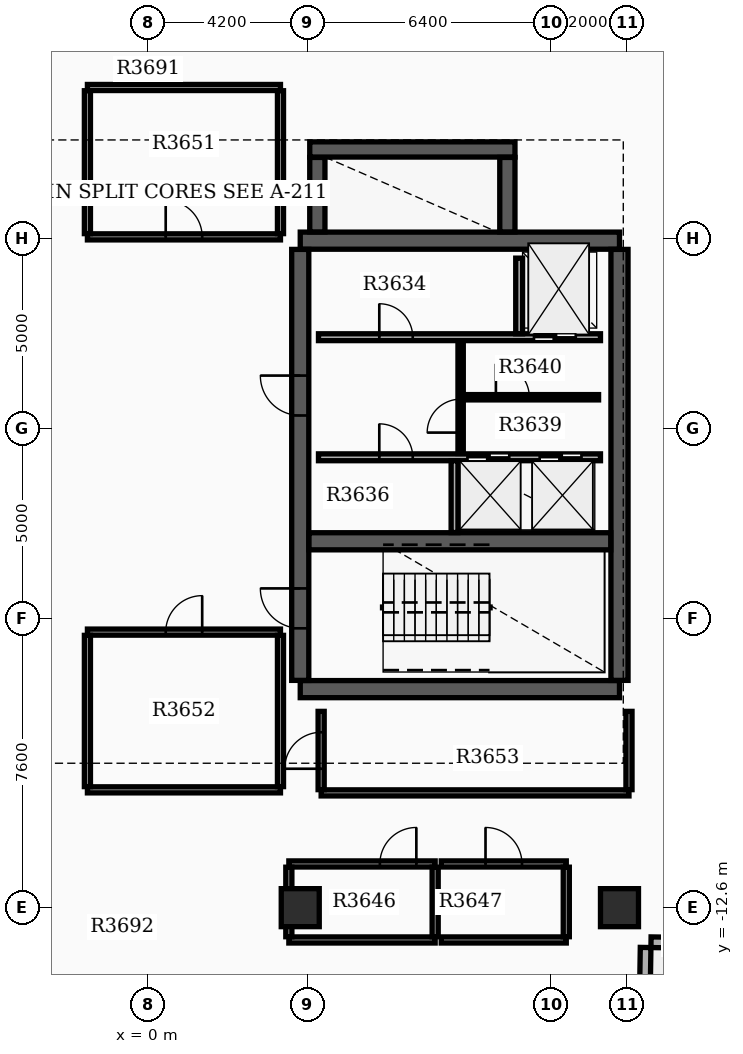
"""IFC4 building model, lengths in metres.
Left out: names, types, materials, properties, quantities, classifications, styles, units other than length and angle.
Written with IfcOpenShell. Run it as: python <this file> out.ifc"""

import sys

from ifc_helpers import new_model, si_unit, direction, frame, frame_2d, origin, origin_2d, place, context, subcontext, project, spatial, rectangle, extrude, element, fill, save


model = new_model("IFC4")
c1 = context("Model", 3, precision=1e-05, world=origin(), true_north=direction((0.0, 1.0)))
c2 = subcontext(c1, "Body", "Model", "MODEL_VIEW")
j1 = project(units=[si_unit("LENGTHUNIT", "METRE"), si_unit("PLANEANGLEUNIT", "RADIAN")], contexts=[c1])
p1 = place(None, origin())
s1 = spatial("IfcSite", under=j1, at=p1, CompositionType="ELEMENT")
p2 = place(p1, origin())
s2 = spatial("IfcBuilding", under=s1, at=p2, CompositionType="ELEMENT")
p3 = place(p2, frame((0.0, 0.0, 228.6)))
s3 = spatial("IfcBuildingStorey", under=s2, at=p3, CompositionType="ELEMENT", Elevation=228.6)
for number, where, z_axis, x_axis in (
    (1, (4.0, -6.85, 0.0), (0.0, 0.0, 1.0), (1.0, 0.0, 0.0)),
    (2, (4.0, 4.95, 0.0), (0.0, 0.0, 1.0), (1.0, 0.0, 0.0)),
):
    element("IfcWall", number, at=place(p3, frame(where, z_axis=z_axis, x_axis=x_axis)), inside=s3, PredefinedType="SHEAR", context=c2, shape_type="SweptSolid", body=[
        extrude(rectangle(XDim=8.4, YDim=0.45, at=frame_2d((4.2, 0.0))), origin(), (0.0, 0.0, 1.0), 3.7),
    ])
p4 = place(p3, frame((4.0, -6.62, 0.0), z_axis=(0.0, 0.0, 1.0), x_axis=(0.0, 1.0, 0.0)))
e3 = element("IfcWall", 3, at=p4, inside=s3, PredefinedType="SHEAR", context=c2, shape_type="SweptSolid", body=[
    extrude(rectangle(XDim=11.34, YDim=0.45, at=frame_2d((5.67, 0.0))), origin(), (0.0, 0.0, 1.0), 3.7),
])
p5 = place(p4, frame((1.37, 0.0, 0.0)))
e4 = element("IfcOpeningElement", 4, at=p5, cuts=e3, PredefinedType="OPENING", context=c2, shape_type="SweptSolid", body=[
    extrude(rectangle(XDim=1.05, YDim=2.15, at=frame_2d((0.525, 1.075))), frame((0.0, 0.235, 0.0), z_axis=(0.0, -1.0, 0.0), x_axis=(1.0, 0.0, 0.0)), (0.0, 0.0, 1.0), 0.47),
])
p6 = place(p4, frame((6.97, 0.0, 0.0)))
e5 = element("IfcOpeningElement", 5, at=p6, cuts=e3, PredefinedType="OPENING", context=c2, shape_type="SweptSolid", body=[
    extrude(rectangle(XDim=1.05, YDim=2.15, at=frame_2d((0.525, 1.075))), frame((0.0, 0.235, 0.0), z_axis=(0.0, -1.0, 0.0), x_axis=(1.0, 0.0, 0.0)), (0.0, 0.0, 1.0), 0.47),
])
p7 = place(p3, frame((12.4, -6.62, 0.0), z_axis=(0.0, 0.0, 1.0), x_axis=(0.0, 1.0, 0.0)))
e6 = element("IfcWall", 6, at=p7, inside=s3, PredefinedType="SHEAR", context=c2, shape_type="SweptSolid", body=[
    extrude(rectangle(XDim=11.34, YDim=0.45, at=frame_2d((5.67, 0.0))), origin(), (0.0, 0.0, 1.0), 3.7),
])
p8 = place(p3, frame((4.23, -2.96, 0.0), z_axis=(0.0, 0.0, 1.0), x_axis=(1.0, 0.0, 0.0)))
e7 = element("IfcWall", 7, at=p8, inside=s3, PredefinedType="SHEAR", context=c2, shape_type="SweptSolid", body=[
    extrude(rectangle(XDim=7.94, YDim=0.45, at=frame_2d((3.97, 0.0))), origin(), (0.0, 0.0, 1.0), 3.7),
])
p9 = place(p3, frame((4.45, 5.18, 0.0), z_axis=(0.0, 0.0, 1.0), x_axis=(0.0, 1.0, 0.0)))
e8 = element("IfcWall", 8, at=p9, inside=s3, PredefinedType="SHEAR", context=c2, shape_type="SweptSolid", body=[
    extrude(rectangle(XDim=1.96, YDim=0.4, at=frame_2d((0.98, 0.0))), origin(), (0.0, 0.0, 1.0), 3.7),
])
p10 = place(p3, frame((4.25, 7.35, 0.0), z_axis=(0.0, 0.0, 1.0), x_axis=(1.0, 0.0, 0.0)))
e9 = element("IfcWall", 9, at=p10, inside=s3, PredefinedType="SHEAR", context=c2, shape_type="SweptSolid", body=[
    extrude(rectangle(XDim=5.4, YDim=0.4, at=frame_2d((2.7, 0.0))), origin(), (0.0, 0.0, 1.0), 3.7),
])
p11 = place(p3, frame((9.45, 5.18, 0.0), z_axis=(0.0, 0.0, 1.0), x_axis=(0.0, 1.0, 0.0)))
e10 = element("IfcWall", 10, at=p11, inside=s3, PredefinedType="SHEAR", context=c2, shape_type="SweptSolid", body=[
    extrude(rectangle(XDim=1.96, YDim=0.4, at=frame_2d((0.98, 0.0))), origin(), (0.0, 0.0, 1.0), 3.7),
])
for number, where, z_axis, x_axis in (
    (11, (12.4, -12.6, 0.0), (0.0, 0.0, 1.0), (1.0, 0.0, 0.0)),
    (12, (4.0, -12.6, 0.0), (0.0, 0.0, 1.0), (1.0, 0.0, 0.0)),
):
    element("IfcColumn", number, at=place(p3, frame(where, z_axis=z_axis, x_axis=x_axis)), inside=s3, PredefinedType="COLUMN", context=c2, shape_type="SweptSolid", body=[
        extrude(rectangle(XDim=1.0, YDim=1.0, at=origin_2d()), origin(), (0.0, 0.0, 1.0), 3.9),
    ])
p12 = place(p3, frame((14.449, -13.529, 0.0), z_axis=(0.0, 0.0, 1.0), x_axis=(-0.999878147354, 0.015610587569, 0.0)))
e13 = element("IfcWall", 13, at=p12, inside=s3, PredefinedType="STANDARD", context=c2, shape_type="SweptSolid", body=[
    extrude(rectangle(XDim=1.22, YDim=0.28, at=frame_2d((0.61, 0.0))), origin(), (0.0, 0.0, 1.0), 3.18),
])
p13 = place(p3, frame((13.087, -13.647, 0.0), z_axis=(0.0, 0.0, 1.0), x_axis=(-0.015785793208, -0.999875396603, 0.0)))
e14 = element("IfcWall", 14, at=p13, inside=s3, PredefinedType="STANDARD", context=c2, shape_type="SweptSolid", body=[
    extrude(rectangle(XDim=1.5, YDim=0.28, at=frame_2d((0.75, 0.0))), origin(), (0.0, 0.0, 1.0), 3.18),
])
p14 = place(p3, frame((4.48, 2.41, 0.0), z_axis=(0.0, 0.0, 1.0), x_axis=(1.0, 0.0, 0.0)))
e15 = element("IfcWall", 15, at=p14, inside=s3, PredefinedType="SOLIDWALL", context=c2, shape_type="SweptSolid", body=[
    extrude(rectangle(XDim=7.42, YDim=0.18, at=frame_2d((3.71, 0.0))), origin(), (0.0, 0.0, 1.0), 3.17),
])
p15 = place(p14, frame((5.67, 0.0, 0.0)))
e16 = element("IfcOpeningElement", 16, at=p15, cuts=e15, PredefinedType="OPENING", context=c2, shape_type="SweptSolid", body=[
    extrude(rectangle(XDim=1.1, YDim=2.15, at=frame_2d((0.55, 1.075))), frame((0.0, 0.1, 0.0), z_axis=(0.0, -1.0, 0.0), x_axis=(1.0, 0.0, 0.0)), (0.0, 0.0, 1.0), 0.2),
])
p16 = place(p14, frame((1.6, 0.0, 0.0)))
e17 = element("IfcOpeningElement", 17, at=p16, cuts=e15, PredefinedType="OPENING", context=c2, shape_type="SweptSolid", body=[
    extrude(rectangle(XDim=0.88, YDim=2.1, at=frame_2d((0.44, 1.05))), frame((0.0, 0.1, 0.0), z_axis=(0.0, -1.0, 0.0), x_axis=(1.0, 0.0, 0.0)), (0.0, 0.0, 1.0), 0.2),
])
p17 = place(p3, frame((4.48, -0.75, 0.0), z_axis=(0.0, 0.0, 1.0), x_axis=(1.0, 0.0, 0.0)))
e18 = element("IfcWall", 18, at=p17, inside=s3, PredefinedType="SOLIDWALL", context=c2, shape_type="SweptSolid", body=[
    extrude(rectangle(XDim=7.42, YDim=0.18, at=frame_2d((3.71, 0.0))), origin(), (0.0, 0.0, 1.0), 3.17),
])
p18 = place(p17, frame((3.92, 0.0, 0.0)))
e19 = element("IfcOpeningElement", 19, at=p18, cuts=e18, PredefinedType="OPENING", context=c2, shape_type="SweptSolid", body=[
    extrude(rectangle(XDim=1.1, YDim=2.15, at=frame_2d((0.55, 1.075))), frame((0.0, 0.1, 0.0), z_axis=(0.0, -1.0, 0.0), x_axis=(1.0, 0.0, 0.0)), (0.0, 0.0, 1.0), 0.2),
])
p19 = place(p17, frame((5.82, 0.0, 0.0)))
e20 = element("IfcOpeningElement", 20, at=p19, cuts=e18, PredefinedType="OPENING", context=c2, shape_type="SweptSolid", body=[
    extrude(rectangle(XDim=1.1, YDim=2.15, at=frame_2d((0.55, 1.075))), frame((0.0, 0.1, 0.0), z_axis=(0.0, -1.0, 0.0), x_axis=(1.0, 0.0, 0.0)), (0.0, 0.0, 1.0), 0.2),
])
p20 = place(p17, frame((1.6, 0.0, 0.0)))
e21 = element("IfcOpeningElement", 21, at=p20, cuts=e18, PredefinedType="OPENING", context=c2, shape_type="SweptSolid", body=[
    extrude(rectangle(XDim=0.88, YDim=2.1, at=frame_2d((0.44, 1.05))), frame((0.0, 0.1, 0.0), z_axis=(0.0, -1.0, 0.0), x_axis=(1.0, 0.0, 0.0)), (0.0, 0.0, 1.0), 0.2),
])
p21 = place(p3, frame((9.76, 2.5, 0.0), z_axis=(0.0, 0.0, 1.0), x_axis=(0.0, 1.0, 0.0)))
e22 = element("IfcWall", 22, at=p21, inside=s3, PredefinedType="SOLIDWALL", context=c2, shape_type="SweptSolid", body=[
    extrude(rectangle(XDim=1.99, YDim=0.18, at=frame_2d((0.995, 0.0))), origin(), (0.0, 0.0, 1.0), 3.17),
])
p22 = place(p3, frame((8.06, -2.73, 0.0), z_axis=(0.0, 0.0, 1.0), x_axis=(0.0, 1.0, 0.0)))
e23 = element("IfcWall", 23, at=p22, inside=s3, PredefinedType="SOLIDWALL", context=c2, shape_type="SweptSolid", body=[
    extrude(rectangle(XDim=1.89, YDim=0.18, at=frame_2d((0.945, 0.0))), origin(), (0.0, 0.0, 1.0), 3.17),
])
p23 = place(p3, frame((8.22, -0.65, 0.0), z_axis=(0.0, 0.0, 1.0), x_axis=(0.0, 1.0, 0.0)))
e24 = element("IfcWall", 24, at=p23, inside=s3, PredefinedType="SOLIDWALL", context=c2, shape_type="SweptSolid", body=[
    extrude(rectangle(XDim=2.96, YDim=0.14, at=frame_2d((1.48, 0.0))), origin(), (0.0, 0.0, 1.0), 3.17),
])
p24 = place(p23, frame((0.55, 0.0, 0.0)))
e25 = element("IfcOpeningElement", 25, at=p24, cuts=e24, PredefinedType="OPENING", context=c2, shape_type="SweptSolid", body=[
    extrude(rectangle(XDim=0.88, YDim=2.1, at=frame_2d((0.44, 1.05))), frame((0.0, 0.08, 0.0), z_axis=(0.0, -1.0, 0.0), x_axis=(1.0, 0.0, 0.0)), (0.0, 0.0, 1.0), 0.16),
])
p25 = place(p3, frame((8.298, 0.83, 0.0), z_axis=(0.0, 0.0, 1.0), x_axis=(1.0, 0.0, 0.0)))
e26 = element("IfcWall", 26, at=p25, inside=s3, PredefinedType="PARTITIONING", context=c2, shape_type="SweptSolid", body=[
    extrude(rectangle(XDim=3.552, YDim=0.14, at=frame_2d((1.776, 0.0))), origin(), (0.0, 0.0, 1.0), 3.17),
])
p26 = place(p25, frame((0.85, 0.0, 0.0)))
e27 = element("IfcOpeningElement", 27, at=p26, cuts=e26, PredefinedType="OPENING", context=c2, shape_type="SweptSolid", body=[
    extrude(rectangle(XDim=0.88, YDim=2.1, at=frame_2d((0.44, 1.05))), frame((0.0, 0.08, 0.0), z_axis=(0.0, -1.0, 0.0), x_axis=(1.0, 0.0, 0.0)), (0.0, 0.0, 1.0), 0.16),
])
p27 = place(p3, frame((3.7, -13.45, 0.0), z_axis=(0.0, 0.0, 1.0), x_axis=(1.0, 0.0, 0.0)))
e28 = element("IfcWall", 28, at=p27, inside=s3, PredefinedType="PARTITIONING", context=c2, shape_type="SweptSolid", body=[
    extrude(rectangle(XDim=3.85, YDim=0.16, at=frame_2d((1.925, 0.0))), origin(), (0.0, 0.0, 1.0), 3.17),
])
p28 = place(p3, frame((3.7, -11.45, 0.0), z_axis=(0.0, 0.0, 1.0), x_axis=(1.0, 0.0, 0.0)))
e29 = element("IfcWall", 29, at=p28, inside=s3, PredefinedType="PARTITIONING", context=c2, shape_type="SweptSolid", body=[
    extrude(rectangle(XDim=3.85, YDim=0.16, at=frame_2d((1.925, 0.0))), origin(), (0.0, 0.0, 1.0), 3.17),
])
p29 = place(p28, frame((2.395, 0.0, 0.0)))
e30 = element("IfcOpeningElement", 30, at=p29, cuts=e29, PredefinedType="OPENING", context=c2, shape_type="SweptSolid", body=[
    extrude(rectangle(XDim=0.96, YDim=2.15, at=frame_2d((0.48, 1.075))), frame((0.0, 0.09, 0.0), z_axis=(0.0, -1.0, 0.0), x_axis=(1.0, 0.0, 0.0)), (0.0, 0.0, 1.0), 0.18),
])
for number, where, z_axis, x_axis in (
    (31, (3.7, -13.365, 0.0), (0.0, 0.0, 1.0), (0.0, 1.0, 0.0)),
    (32, (7.55, -13.365, 0.0), (0.0, 0.0, 1.0), (0.0, 1.0, 0.0)),
):
    element("IfcWall", number, at=place(p3, frame(where, z_axis=z_axis, x_axis=x_axis)), inside=s3, PredefinedType="PARTITIONING", context=c2, shape_type="SweptSolid", body=[
        extrude(rectangle(XDim=1.83, YDim=0.16, at=frame_2d((0.915, 0.0))), origin(), (0.0, 0.0, 1.0), 3.17),
    ])
p30 = place(p3, frame((7.71, -13.45, 0.0), z_axis=(0.0, 0.0, 1.0), x_axis=(1.0, 0.0, 0.0)))
e33 = element("IfcWall", 33, at=p30, inside=s3, PredefinedType="PARTITIONING", context=c2, shape_type="SweptSolid", body=[
    extrude(rectangle(XDim=3.29, YDim=0.16, at=frame_2d((1.645, 0.0))), origin(), (0.0, 0.0, 1.0), 3.17),
])
p31 = place(p3, frame((7.71, -11.45, 0.0), z_axis=(0.0, 0.0, 1.0), x_axis=(1.0, 0.0, 0.0)))
e34 = element("IfcWall", 34, at=p31, inside=s3, PredefinedType="PARTITIONING", context=c2, shape_type="SweptSolid", body=[
    extrude(rectangle(XDim=3.29, YDim=0.16, at=frame_2d((1.645, 0.0))), origin(), (0.0, 0.0, 1.0), 3.17),
])
p32 = place(p31, frame((1.165, 0.0, 0.0)))
e35 = element("IfcOpeningElement", 35, at=p32, cuts=e34, PredefinedType="OPENING", context=c2, shape_type="SweptSolid", body=[
    extrude(rectangle(XDim=0.96, YDim=2.15, at=frame_2d((0.48, 1.075))), frame((0.0, 0.09, 0.0), z_axis=(0.0, -1.0, 0.0), x_axis=(1.0, 0.0, 0.0)), (0.0, 0.0, 1.0), 0.18),
])
p33 = place(p3, frame((11.0, -13.365, 0.0), z_axis=(0.0, 0.0, 1.0), x_axis=(0.0, 1.0, 0.0)))
e36 = element("IfcWall", 36, at=p33, inside=s3, PredefinedType="PARTITIONING", context=c2, shape_type="SweptSolid", body=[
    extrude(rectangle(XDim=1.83, YDim=0.16, at=frame_2d((0.915, 0.0))), origin(), (0.0, 0.0, 1.0), 3.17),
])
p34 = place(p3, frame((-1.6, 5.05, 0.0), z_axis=(0.0, 0.0, 1.0), x_axis=(1.0, 0.0, 0.0)))
e37 = element("IfcWall", 37, at=p34, inside=s3, PredefinedType="PARTITIONING", context=c2, shape_type="SweptSolid", body=[
    extrude(rectangle(XDim=5.08, YDim=0.16, at=frame_2d((2.54, 0.0))), origin(), (0.0, 0.0, 1.0), 3.17),
])
p35 = place(p34, frame((2.06, 0.0, 0.0)))
e38 = element("IfcOpeningElement", 38, at=p35, cuts=e37, PredefinedType="OPENING", context=c2, shape_type="SweptSolid", body=[
    extrude(rectangle(XDim=0.96, YDim=2.15, at=frame_2d((0.48, 1.075))), frame((0.0, 0.09, 0.0), z_axis=(0.0, -1.0, 0.0), x_axis=(1.0, 0.0, 0.0)), (0.0, 0.0, 1.0), 0.18),
])
p36 = place(p3, frame((-1.6, 8.98, 0.0), z_axis=(0.0, 0.0, 1.0), x_axis=(1.0, 0.0, 0.0)))
e39 = element("IfcWall", 39, at=p36, inside=s3, PredefinedType="PARTITIONING", context=c2, shape_type="SweptSolid", body=[
    extrude(rectangle(XDim=5.08, YDim=0.16, at=frame_2d((2.54, 0.0))), origin(), (0.0, 0.0, 1.0), 3.17),
])
for number, where, z_axis, x_axis in (
    (40, (-1.6, 5.135, 0.0), (0.0, 0.0, 1.0), (0.0, 1.0, 0.0)),
    (41, (3.48, 5.135, 0.0), (0.0, 0.0, 1.0), (0.0, 1.0, 0.0)),
):
    element("IfcWall", number, at=place(p3, frame(where, z_axis=z_axis, x_axis=x_axis)), inside=s3, PredefinedType="PARTITIONING", context=c2, shape_type="SweptSolid", body=[
        extrude(rectangle(XDim=3.76, YDim=0.16, at=frame_2d((1.88, 0.0))), origin(), (0.0, 0.0, 1.0), 3.17),
    ])
p37 = place(p3, frame((-1.6, -9.5, 0.0), z_axis=(0.0, 0.0, 1.0), x_axis=(1.0, 0.0, 0.0)))
e42 = element("IfcWall", 42, at=p37, inside=s3, PredefinedType="PARTITIONING", context=c2, shape_type="SweptSolid", body=[
    extrude(rectangle(XDim=5.08, YDim=0.16, at=frame_2d((2.54, 0.0))), origin(), (0.0, 0.0, 1.0), 3.17),
])
p38 = place(p3, frame((-1.6, -5.35, 0.0), z_axis=(0.0, 0.0, 1.0), x_axis=(1.0, 0.0, 0.0)))
e43 = element("IfcWall", 43, at=p38, inside=s3, PredefinedType="PARTITIONING", context=c2, shape_type="SweptSolid", body=[
    extrude(rectangle(XDim=5.08, YDim=0.16, at=frame_2d((2.54, 0.0))), origin(), (0.0, 0.0, 1.0), 3.17),
])
p39 = place(p38, frame((2.06, 0.0, 0.0)))
e44 = element("IfcOpeningElement", 44, at=p39, cuts=e43, PredefinedType="OPENING", context=c2, shape_type="SweptSolid", body=[
    extrude(rectangle(XDim=0.96, YDim=2.15, at=frame_2d((0.48, 1.075))), frame((0.0, 0.09, 0.0), z_axis=(0.0, -1.0, 0.0), x_axis=(1.0, 0.0, 0.0)), (0.0, 0.0, 1.0), 0.18),
])
for number, where, z_axis, x_axis in (
    (45, (-1.6, -9.415, 0.0), (0.0, 0.0, 1.0), (0.0, 1.0, 0.0)),
    (46, (3.48, -9.415, 0.0), (0.0, 0.0, 1.0), (0.0, 1.0, 0.0)),
):
    element("IfcWall", number, at=place(p3, frame(where, z_axis=z_axis, x_axis=x_axis)), inside=s3, PredefinedType="PARTITIONING", context=c2, shape_type="SweptSolid", body=[
        extrude(rectangle(XDim=3.98, YDim=0.16, at=frame_2d((1.99, 0.0))), origin(), (0.0, 0.0, 1.0), 3.17),
    ])
p40 = place(p3, frame((4.55, -9.58, 0.0), z_axis=(0.0, 0.0, 1.0), x_axis=(1.0, 0.0, 0.0)))
e47 = element("IfcWall", 47, at=p40, inside=s3, PredefinedType="PARTITIONING", context=c2, shape_type="SweptSolid", body=[
    extrude(rectangle(XDim=8.1, YDim=0.16, at=frame_2d((4.05, 0.0))), origin(), (0.0, 0.0, 1.0), 3.17),
])
p41 = place(p3, frame((4.55, -9.495, 0.0), z_axis=(0.0, 0.0, 1.0), x_axis=(0.0, 1.0, 0.0)))
e48 = element("IfcWall", 48, at=p41, inside=s3, PredefinedType="PARTITIONING", context=c2, shape_type="SweptSolid", body=[
    extrude(rectangle(XDim=2.06, YDim=0.16, at=frame_2d((1.03, 0.0))), origin(), (0.0, 0.0, 1.0), 3.17),
])
p42 = place(p41, frame((0.55, 0.0, 0.0)))
e49 = element("IfcOpeningElement", 49, at=p42, cuts=e48, PredefinedType="OPENING", context=c2, shape_type="SweptSolid", body=[
    extrude(rectangle(XDim=0.96, YDim=2.15, at=frame_2d((0.48, 1.075))), frame((0.0, 0.09, 0.0), z_axis=(0.0, -1.0, 0.0), x_axis=(1.0, 0.0, 0.0)), (0.0, 0.0, 1.0), 0.18),
])
p43 = place(p3, frame((12.65, -9.495, 0.0), z_axis=(0.0, 0.0, 1.0), x_axis=(0.0, 1.0, 0.0)))
e50 = element("IfcWall", 50, at=p43, inside=s3, PredefinedType="PARTITIONING", context=c2, shape_type="SweptSolid", body=[
    extrude(rectangle(XDim=2.06, YDim=0.16, at=frame_2d((1.03, 0.0))), origin(), (0.0, 0.0, 1.0), 3.17),
])
p44 = place(p5, origin())
e51 = element("IfcDoor", 51, at=p44, inside=s3, OperationType="SINGLE_SWING_RIGHT", PredefinedType="DOOR", context=c2, shape_type="SweptSolid", body=[
    extrude(rectangle(XDim=1.05, YDim=2.15, at=frame_2d((0.525, 1.075))), frame((0.0, 0.025, 0.0), z_axis=(0.0, -1.0, 0.0), x_axis=(1.0, 0.0, 0.0)), (0.0, 0.0, 1.0), 0.05),
])
fill(e4, e51)
p45 = place(p6, origin())
e52 = element("IfcDoor", 52, at=p45, inside=s3, OperationType="SINGLE_SWING_RIGHT", PredefinedType="DOOR", context=c2, shape_type="SweptSolid", body=[
    extrude(rectangle(XDim=1.05, YDim=2.15, at=frame_2d((0.525, 1.075))), frame((0.0, 0.025, 0.0), z_axis=(0.0, -1.0, 0.0), x_axis=(1.0, 0.0, 0.0)), (0.0, 0.0, 1.0), 0.05),
])
fill(e5, e52)
p46 = place(p15, origin())
e53 = element("IfcDoor", 53, at=p46, inside=s3, OperationType="DOUBLE_DOOR_SLIDING", PredefinedType="DOOR", context=c2, shape_type="SweptSolid", body=[
    extrude(rectangle(XDim=1.1, YDim=2.15, at=frame_2d((0.55, 1.075))), frame((0.0, 0.025, 0.0), z_axis=(0.0, -1.0, 0.0), x_axis=(1.0, 0.0, 0.0)), (0.0, 0.0, 1.0), 0.05),
])
fill(e16, e53)
p47 = place(p18, origin())
e54 = element("IfcDoor", 54, at=p47, inside=s3, OperationType="DOUBLE_DOOR_SLIDING", PredefinedType="DOOR", context=c2, shape_type="SweptSolid", body=[
    extrude(rectangle(XDim=1.1, YDim=2.15, at=frame_2d((0.55, 1.075))), frame((0.0, 0.025, 0.0), z_axis=(0.0, -1.0, 0.0), x_axis=(1.0, 0.0, 0.0)), (0.0, 0.0, 1.0), 0.05),
])
fill(e19, e54)
p48 = place(p19, origin())
e55 = element("IfcDoor", 55, at=p48, inside=s3, OperationType="DOUBLE_DOOR_SLIDING", PredefinedType="DOOR", context=c2, shape_type="SweptSolid", body=[
    extrude(rectangle(XDim=1.1, YDim=2.15, at=frame_2d((0.55, 1.075))), frame((0.0, 0.025, 0.0), z_axis=(0.0, -1.0, 0.0), x_axis=(1.0, 0.0, 0.0)), (0.0, 0.0, 1.0), 0.05),
])
fill(e20, e55)
p49 = place(p16, origin())
e56 = element("IfcDoor", 56, at=p49, inside=s3, OperationType="SINGLE_SWING_LEFT", PredefinedType="DOOR", context=c2, shape_type="SweptSolid", body=[
    extrude(rectangle(XDim=0.88, YDim=2.1, at=frame_2d((0.44, 1.05))), frame((0.0, 0.025, 0.0), z_axis=(0.0, -1.0, 0.0), x_axis=(1.0, 0.0, 0.0)), (0.0, 0.0, 1.0), 0.05),
])
fill(e17, e56)
p50 = place(p20, origin())
e57 = element("IfcDoor", 57, at=p50, inside=s3, OperationType="SINGLE_SWING_LEFT", PredefinedType="DOOR", context=c2, shape_type="SweptSolid", body=[
    extrude(rectangle(XDim=0.88, YDim=2.1, at=frame_2d((0.44, 1.05))), frame((0.0, 0.025, 0.0), z_axis=(0.0, -1.0, 0.0), x_axis=(1.0, 0.0, 0.0)), (0.0, 0.0, 1.0), 0.05),
])
fill(e21, e57)
p51 = place(p24, origin())
e58 = element("IfcDoor", 58, at=p51, inside=s3, OperationType="SINGLE_SWING_LEFT", PredefinedType="DOOR", context=c2, shape_type="SweptSolid", body=[
    extrude(rectangle(XDim=0.88, YDim=2.1, at=frame_2d((0.44, 1.05))), frame((0.0, 0.025, 0.0), z_axis=(0.0, -1.0, 0.0), x_axis=(1.0, 0.0, 0.0)), (0.0, 0.0, 1.0), 0.05),
])
fill(e25, e58)
p52 = place(p26, origin())
e59 = element("IfcDoor", 59, at=p52, inside=s3, OperationType="SINGLE_SWING_LEFT", PredefinedType="DOOR", context=c2, shape_type="SweptSolid", body=[
    extrude(rectangle(XDim=0.88, YDim=2.1, at=frame_2d((0.44, 1.05))), frame((0.0, 0.025, 0.0), z_axis=(0.0, -1.0, 0.0), x_axis=(1.0, 0.0, 0.0)), (0.0, 0.0, 1.0), 0.05),
])
fill(e27, e59)
p53 = place(p29, origin())
e60 = element("IfcDoor", 60, at=p53, inside=s3, OperationType="SINGLE_SWING_RIGHT", PredefinedType="DOOR", context=c2, shape_type="SweptSolid", body=[
    extrude(rectangle(XDim=0.96, YDim=2.15, at=frame_2d((0.48, 1.075))), frame((0.0, 0.025, 0.0), z_axis=(0.0, -1.0, 0.0), x_axis=(1.0, 0.0, 0.0)), (0.0, 0.0, 1.0), 0.05),
])
fill(e30, e60)
p54 = place(p32, origin())
e61 = element("IfcDoor", 61, at=p54, inside=s3, OperationType="SINGLE_SWING_LEFT", PredefinedType="DOOR", context=c2, shape_type="SweptSolid", body=[
    extrude(rectangle(XDim=0.96, YDim=2.15, at=frame_2d((0.48, 1.075))), frame((0.0, 0.025, 0.0), z_axis=(0.0, -1.0, 0.0), x_axis=(1.0, 0.0, 0.0)), (0.0, 0.0, 1.0), 0.05),
])
fill(e35, e61)
p55 = place(p35, origin())
e62 = element("IfcDoor", 62, at=p55, inside=s3, OperationType="SINGLE_SWING_LEFT", PredefinedType="DOOR", context=c2, shape_type="SweptSolid", body=[
    extrude(rectangle(XDim=0.96, YDim=2.15, at=frame_2d((0.48, 1.075))), frame((0.0, 0.025, 0.0), z_axis=(0.0, -1.0, 0.0), x_axis=(1.0, 0.0, 0.0)), (0.0, 0.0, 1.0), 0.05),
])
fill(e38, e62)
p56 = place(p39, origin())
e63 = element("IfcDoor", 63, at=p56, inside=s3, OperationType="SINGLE_SWING_RIGHT", PredefinedType="DOOR", context=c2, shape_type="SweptSolid", body=[
    extrude(rectangle(XDim=0.96, YDim=2.15, at=frame_2d((0.48, 1.075))), frame((0.0, 0.025, 0.0), z_axis=(0.0, -1.0, 0.0), x_axis=(1.0, 0.0, 0.0)), (0.0, 0.0, 1.0), 0.05),
])
fill(e44, e63)
p57 = place(p42, origin())
e64 = element("IfcDoor", 64, at=p57, inside=s3, OperationType="SINGLE_SWING_LEFT", PredefinedType="DOOR", context=c2, shape_type="SweptSolid", body=[
    extrude(rectangle(XDim=0.96, YDim=2.15, at=frame_2d((0.48, 1.075))), frame((0.0, 0.025, 0.0), z_axis=(0.0, -1.0, 0.0), x_axis=(1.0, 0.0, 0.0)), (0.0, 0.0, 1.0), 0.05),
])
fill(e49, e64)
save(model, sys.argv[1])
